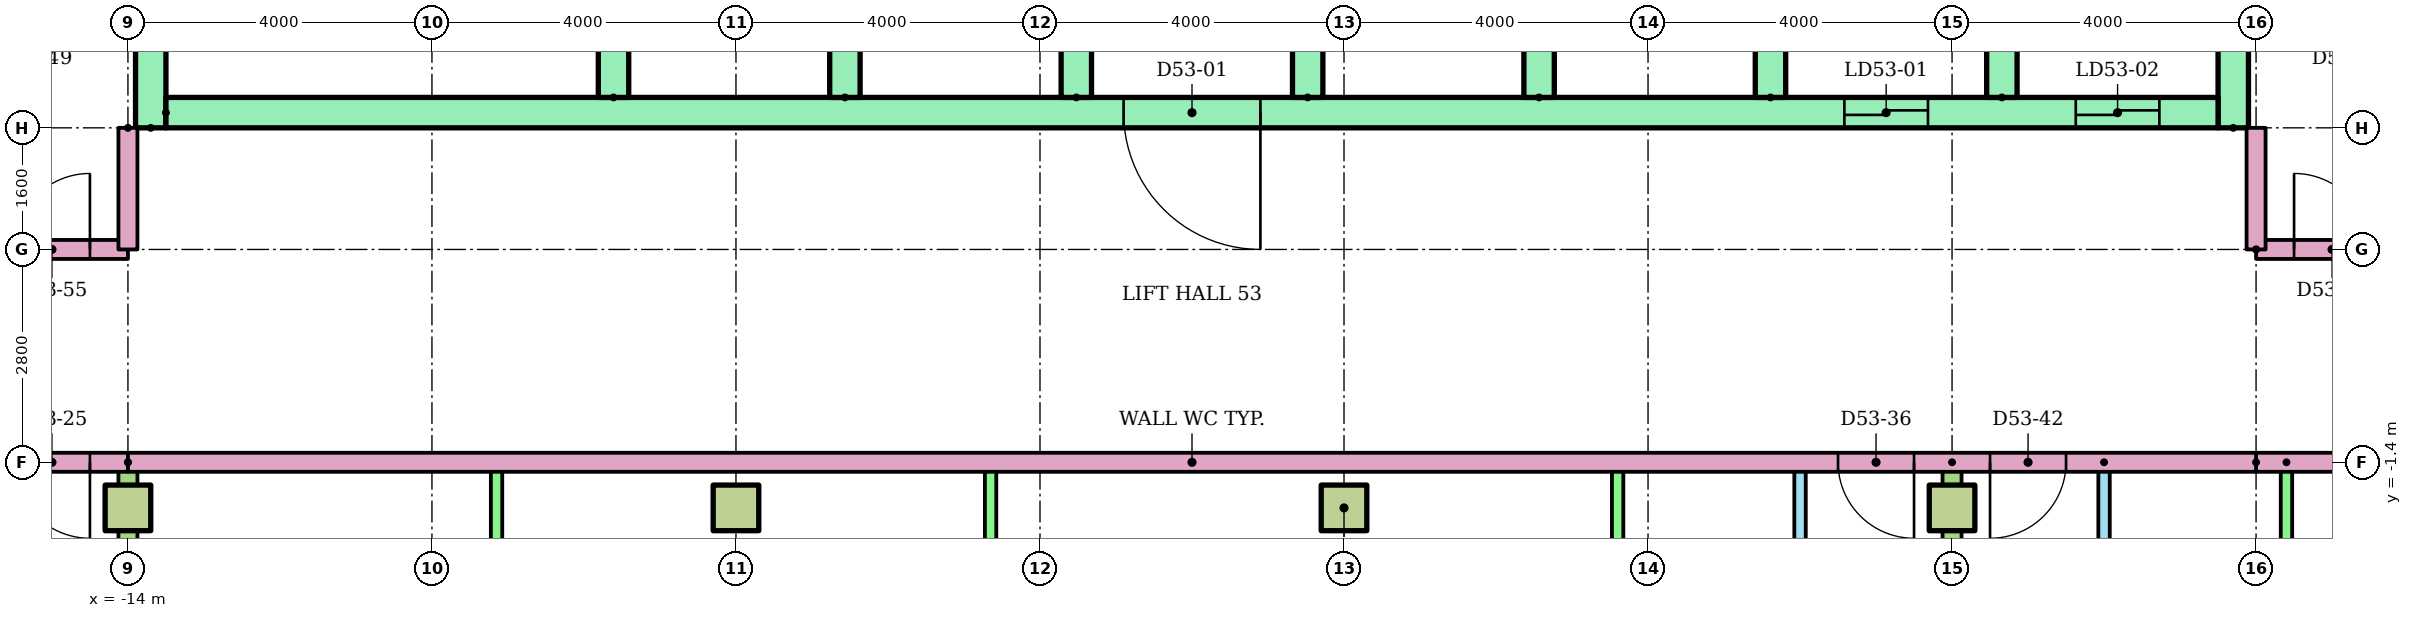
"""IFC4 building model, lengths in metres.
Left out: names, types, materials, properties, quantities, classifications, styles, units other than length and angle.
Written with IfcOpenShell. Run it as: python <this file> out.ifc"""

import sys

from ifc_helpers import new_model, si_unit, direction, frame, frame_2d, origin, origin_2d, place, context, subcontext, project, spatial, rectangle, extrude, element, fill, save


model = new_model("IFC4")
c1 = context("Model", 3, precision=1e-05, world=origin(), true_north=direction((0.0, 1.0)))
c2 = subcontext(c1, "Body", "Model", "MODEL_VIEW")
j1 = project(units=[si_unit("LENGTHUNIT", "METRE"), si_unit("PLANEANGLEUNIT", "RADIAN")], contexts=[c1])
p1 = place(None, origin())
s1 = spatial("IfcSite", under=j1, at=p1, CompositionType="ELEMENT")
p2 = place(p1, origin())
s2 = spatial("IfcBuilding", under=s1, at=p2, CompositionType="ELEMENT")
p3 = place(p2, frame((0.0, 0.0, 207.6)))
s3 = spatial("IfcBuildingStorey", under=s2, at=p3, CompositionType="ELEMENT", Elevation=207.6)
for number, where in (
    (1, (-14.0, -2.0, 0.0)),
    (2, (-6.0, -2.0, 0.0)),
    (3, (2.0, -2.0, 0.0)),
    (4, (10.0, -2.0, 0.0)),
):
    element("IfcColumn", number, at=place(p3, frame(where)), inside=s3, PredefinedType="COLUMN", context=c2, shape_type="SweptSolid", body=[
        extrude(rectangle(XDim=0.6, YDim=0.6, at=origin_2d()), origin(), (0.0, 0.0, 1.0), 3.2),
    ])
for number, where, z_axis, x_axis in (
    (5, (-13.7, 3.0, 0.0), (0.0, 0.0, 1.0), (0.0, 1.0, 0.0)),
    (6, (13.7, 3.0, 0.0), (0.0, 0.0, 1.0), (0.0, 1.0, 0.0)),
):
    element("IfcWall", number, at=place(p3, frame(where, z_axis=z_axis, x_axis=x_axis)), inside=s3, PredefinedType="SHEAR", context=c2, shape_type="SweptSolid", body=[
        extrude(rectangle(XDim=17.0, YDim=0.4, at=frame_2d((8.5, 0.0))), origin(), (0.0, 0.0, 1.0), 2.92),
    ])
p4 = place(p3, frame((-13.5, 3.2, 0.0)))
e7 = element("IfcWall", 7, at=p4, inside=s3, PredefinedType="SHEAR", context=c2, shape_type="SweptSolid", body=[
    extrude(rectangle(XDim=27.0, YDim=0.4, at=frame_2d((13.5, 0.0))), origin(), (0.0, 0.0, 1.0), 2.92),
])
p5 = place(p4, frame((22.083, 0.0, 0.0)))
e8 = element("IfcOpeningElement", 8, at=p5, cuts=e7, PredefinedType="OPENING", context=c2, shape_type="SweptSolid", body=[
    extrude(rectangle(XDim=1.1, YDim=2.1, at=frame_2d((0.55, 1.05))), frame((0.0, 0.21, 0.0), z_axis=(0.0, -1.0, 0.0), x_axis=(1.0, 0.0, 0.0)), (0.0, 0.0, 1.0), 0.42),
])
p6 = place(p4, frame((25.128, 0.0, 0.0)))
e9 = element("IfcOpeningElement", 9, at=p6, cuts=e7, PredefinedType="OPENING", context=c2, shape_type="SweptSolid", body=[
    extrude(rectangle(XDim=1.1, YDim=2.1, at=frame_2d((0.55, 1.05))), frame((0.0, 0.21, 0.0), z_axis=(0.0, -1.0, 0.0), x_axis=(1.0, 0.0, 0.0)), (0.0, 0.0, 1.0), 0.42),
])
p7 = place(p4, frame((12.6, 0.0, 0.0)))
e10 = element("IfcOpeningElement", 10, at=p7, cuts=e7, PredefinedType="OPENING", context=c2, shape_type="SweptSolid", body=[
    extrude(rectangle(XDim=1.8, YDim=2.1, at=frame_2d((0.9, 1.05))), frame((0.0, 0.21, 0.0), z_axis=(0.0, -1.0, 0.0), x_axis=(1.0, 0.0, 0.0)), (0.0, 0.0, 1.0), 0.42),
])
for number, where, z_axis, x_axis in (
    (11, (-7.611, 3.4, 0.0), (0.0, 0.0, 1.0), (0.0, 1.0, 0.0)),
    (12, (-4.567, 3.4, 0.0), (0.0, 0.0, 1.0), (0.0, 1.0, 0.0)),
    (13, (-1.522, 3.4, 0.0), (0.0, 0.0, 1.0), (0.0, 1.0, 0.0)),
    (14, (1.522, 3.4, 0.0), (0.0, 0.0, 1.0), (0.0, 1.0, 0.0)),
    (15, (4.567, 3.4, 0.0), (0.0, 0.0, 1.0), (0.0, 1.0, 0.0)),
    (16, (7.611, 3.4, 0.0), (0.0, 0.0, 1.0), (0.0, 1.0, 0.0)),
    (17, (10.656, 3.4, 0.0), (0.0, 0.0, 1.0), (0.0, 1.0, 0.0)),
):
    element("IfcWall", number, at=place(p3, frame(where, z_axis=z_axis, x_axis=x_axis)), inside=s3, PredefinedType="SHEAR", context=c2, shape_type="SweptSolid", body=[
        extrude(rectangle(XDim=3.0, YDim=0.4, at=frame_2d((1.5, 0.0))), origin(), (0.0, 0.0, 1.0), 2.92),
    ])
p8 = place(p3, frame((8.0, -8.2, 0.0), z_axis=(0.0, 0.0, 1.0), x_axis=(0.0, 1.0, 0.0)))
e18 = element("IfcWall", 18, at=p8, inside=s3, PredefinedType="PARTITIONING", context=c2, shape_type="SweptSolid", body=[
    extrude(rectangle(XDim=6.8, YDim=0.15, at=frame_2d((3.4, 0.0))), origin(), (0.0, 0.0, 1.0), 2.4),
])
p9 = place(p8, frame((4.475, 0.0, 0.0)))
e19 = element("IfcOpeningElement", 19, at=p9, cuts=e18, PredefinedType="OPENING", context=c2, shape_type="SweptSolid", body=[
    extrude(rectangle(XDim=0.9, YDim=2.1, at=frame_2d((0.45, 1.05))), frame((0.0, 0.085, 0.0), z_axis=(0.0, -1.0, 0.0), x_axis=(1.0, 0.0, 0.0)), (0.0, 0.0, 1.0), 0.17),
])
p10 = place(p8, frame((1.125, 0.0, 0.0)))
e20 = element("IfcOpeningElement", 20, at=p10, cuts=e18, PredefinedType="OPENING", context=c2, shape_type="SweptSolid", body=[
    extrude(rectangle(XDim=0.8, YDim=2.1, at=frame_2d((0.4, 1.05))), frame((0.0, 0.085, 0.0), z_axis=(0.0, -1.0, 0.0), x_axis=(1.0, 0.0, 0.0)), (0.0, 0.0, 1.0), 0.17),
])
for number, where, z_axis, x_axis in (
    (21, (5.6, -8.2, 0.0), (0.0, 0.0, 1.0), (0.0, 1.0, 0.0)),
    (22, (-2.65, -8.2, 0.0), (0.0, 0.0, 1.0), (0.0, 1.0, 0.0)),
    (23, (-9.15, -8.2, 0.0), (0.0, 0.0, 1.0), (0.0, 1.0, 0.0)),
):
    element("IfcWall", number, at=place(p3, frame(where, z_axis=z_axis, x_axis=x_axis)), inside=s3, PredefinedType="PARTITIONING", context=c2, shape_type="SweptSolid", body=[
        extrude(rectangle(XDim=6.8, YDim=0.15, at=frame_2d((3.4, 0.0))), origin(), (0.0, 0.0, 1.0), 2.4),
    ])
p11 = place(p3, frame((-14.0, -1.4, 0.0), z_axis=(0.0, 0.0, 1.0), x_axis=(0.0, -1.0, 0.0)))
e24 = element("IfcWall", 24, at=p11, inside=s3, PredefinedType="PARTITIONING", context=c2, shape_type="SweptSolid", body=[
    extrude(rectangle(XDim=15.11, YDim=0.25, at=frame_2d((7.555, 0.0))), origin(), (0.0, 0.0, 1.0), 2.4),
])
p12 = place(p3, frame((12.0, -1.4, 0.0), z_axis=(0.0, 0.0, 1.0), x_axis=(0.0, -1.0, 0.0)))
e25 = element("IfcWall", 25, at=p12, inside=s3, PredefinedType="PARTITIONING", context=c2, shape_type="SweptSolid", body=[
    extrude(rectangle(XDim=6.8, YDim=0.15, at=frame_2d((3.4, 0.0))), origin(), (0.0, 0.0, 1.0), 2.4),
])
p13 = place(p12, frame((1.425, 0.0, 0.0)))
e26 = element("IfcOpeningElement", 26, at=p13, cuts=e25, PredefinedType="OPENING", context=c2, shape_type="SweptSolid", body=[
    extrude(rectangle(XDim=0.9, YDim=2.1, at=frame_2d((0.45, 1.05))), frame((0.0, 0.085, 0.0), z_axis=(0.0, -1.0, 0.0), x_axis=(1.0, 0.0, 0.0)), (0.0, 0.0, 1.0), 0.17),
])
p14 = place(p12, frame((4.875, 0.0, 0.0)))
e27 = element("IfcOpeningElement", 27, at=p14, cuts=e25, PredefinedType="OPENING", context=c2, shape_type="SweptSolid", body=[
    extrude(rectangle(XDim=0.8, YDim=2.1, at=frame_2d((0.4, 1.05))), frame((0.0, 0.085, 0.0), z_axis=(0.0, -1.0, 0.0), x_axis=(1.0, 0.0, 0.0)), (0.0, 0.0, 1.0), 0.17),
])
p15 = place(p3, frame((14.4, -1.4, 0.0), z_axis=(0.0, 0.0, 1.0), x_axis=(0.0, -1.0, 0.0)))
e28 = element("IfcWall", 28, at=p15, inside=s3, PredefinedType="PARTITIONING", context=c2, shape_type="SweptSolid", body=[
    extrude(rectangle(XDim=6.8, YDim=0.15, at=frame_2d((3.4, 0.0))), origin(), (0.0, 0.0, 1.0), 2.4),
])
p16 = place(p3, frame((10.0, -1.4, 0.0), z_axis=(0.0, 0.0, 1.0), x_axis=(0.0, -1.0, 0.0)))
e29 = element("IfcWall", 29, at=p16, inside=s3, PredefinedType="PARTITIONING", context=c2, shape_type="SweptSolid", body=[
    extrude(rectangle(XDim=15.11, YDim=0.25, at=frame_2d((7.555, 0.0))), origin(), (0.0, 0.0, 1.0), 2.4),
])
p17 = place(p3, frame((-14.0, -1.4, 0.0), z_axis=(0.0, 0.0, 1.0), x_axis=(-1.0, 0.0, 0.0)))
e30 = element("IfcWall", 30, at=p17, inside=s3, PredefinedType="PARTITIONING", context=c2, shape_type="SweptSolid", body=[
    extrude(rectangle(XDim=14.92, YDim=0.25, at=frame_2d((7.46, 0.0))), origin(), (0.0, 0.0, 1.0), 2.4),
])
p18 = place(p17, frame((0.5, 0.0, 0.0)))
e31 = element("IfcOpeningElement", 31, at=p18, cuts=e30, PredefinedType="OPENING", context=c2, shape_type="SweptSolid", body=[
    extrude(rectangle(XDim=1.0, YDim=2.1, at=frame_2d((0.5, 1.05))), frame((0.0, 0.135, 0.0), z_axis=(0.0, -1.0, 0.0), x_axis=(1.0, 0.0, 0.0)), (0.0, 0.0, 1.0), 0.27),
])
p19 = place(p3, frame((28.92, -1.4, 0.0), z_axis=(0.0, 0.0, 1.0), x_axis=(-1.0, 0.0, 0.0)))
e32 = element("IfcWall", 32, at=p19, inside=s3, PredefinedType="PARTITIONING", context=c2, shape_type="SweptSolid", body=[
    extrude(rectangle(XDim=14.92, YDim=0.25, at=frame_2d((7.46, 0.0))), origin(), (0.0, 0.0, 1.0), 2.4),
])
p20 = place(p19, frame((9.42, 0.0, 0.0)))
e33 = element("IfcOpeningElement", 33, at=p20, cuts=e32, PredefinedType="OPENING", context=c2, shape_type="SweptSolid", body=[
    extrude(rectangle(XDim=1.0, YDim=2.1, at=frame_2d((0.5, 1.05))), frame((0.0, 0.135, 0.0), z_axis=(0.0, -1.0, 0.0), x_axis=(1.0, 0.0, 0.0)), (0.0, 0.0, 1.0), 0.27),
])
p21 = place(p3, frame((-28.92, 1.4, 0.0)))
e34 = element("IfcWall", 34, at=p21, inside=s3, PredefinedType="PARTITIONING", context=c2, shape_type="SweptSolid", body=[
    extrude(rectangle(XDim=14.92, YDim=0.25, at=frame_2d((7.46, 0.0))), origin(), (0.0, 0.0, 1.0), 2.4),
])
p22 = place(p21, frame((13.42, 0.0, 0.0)))
e35 = element("IfcOpeningElement", 35, at=p22, cuts=e34, PredefinedType="OPENING", context=c2, shape_type="SweptSolid", body=[
    extrude(rectangle(XDim=1.0, YDim=2.1, at=frame_2d((0.5, 1.05))), frame((0.0, 0.135, 0.0), z_axis=(0.0, -1.0, 0.0), x_axis=(1.0, 0.0, 0.0)), (0.0, 0.0, 1.0), 0.27),
])
p23 = place(p3, frame((14.0, 1.4, 0.0)))
e36 = element("IfcWall", 36, at=p23, inside=s3, PredefinedType="PARTITIONING", context=c2, shape_type="SweptSolid", body=[
    extrude(rectangle(XDim=14.92, YDim=0.25, at=frame_2d((7.46, 0.0))), origin(), (0.0, 0.0, 1.0), 2.4),
])
p24 = place(p23, frame((0.5, 0.0, 0.0)))
e37 = element("IfcOpeningElement", 37, at=p24, cuts=e36, PredefinedType="OPENING", context=c2, shape_type="SweptSolid", body=[
    extrude(rectangle(XDim=1.0, YDim=2.1, at=frame_2d((0.5, 1.05))), frame((0.0, 0.135, 0.0), z_axis=(0.0, -1.0, 0.0), x_axis=(1.0, 0.0, 0.0)), (0.0, 0.0, 1.0), 0.27),
])
p25 = place(p3, frame((14.0, -1.4, 0.0), z_axis=(0.0, 0.0, 1.0), x_axis=(-1.0, 0.0, 0.0)))
e38 = element("IfcWall", 38, at=p25, inside=s3, PredefinedType="PARTITIONING", context=c2, shape_type="SweptSolid", body=[
    extrude(rectangle(XDim=28.0, YDim=0.25, at=frame_2d((14.0, 0.0))), origin(), (0.0, 0.0, 1.0), 2.4),
])
p26 = place(p25, frame((4.5, 0.0, 0.0)))
e39 = element("IfcOpeningElement", 39, at=p26, cuts=e38, PredefinedType="OPENING", context=c2, shape_type="SweptSolid", body=[
    extrude(rectangle(XDim=1.0, YDim=2.1, at=frame_2d((0.5, 1.05))), frame((0.0, 0.135, 0.0), z_axis=(0.0, -1.0, 0.0), x_axis=(1.0, 0.0, 0.0)), (0.0, 0.0, 1.0), 0.27),
])
p27 = place(p25, frame((2.5, 0.0, 0.0)))
e40 = element("IfcOpeningElement", 40, at=p27, cuts=e38, PredefinedType="OPENING", context=c2, shape_type="SweptSolid", body=[
    extrude(rectangle(XDim=1.0, YDim=2.1, at=frame_2d((0.5, 1.05))), frame((0.0, 0.135, 0.0), z_axis=(0.0, -1.0, 0.0), x_axis=(1.0, 0.0, 0.0)), (0.0, 0.0, 1.0), 0.27),
])
for number, where, z_axis, x_axis in (
    (41, (-14.0, 3.0, 0.0), (0.0, 0.0, 1.0), (0.0, -1.0, 0.0)),
    (42, (14.0, 1.4, 0.0), (0.0, 0.0, 1.0), (0.0, 1.0, 0.0)),
):
    element("IfcWall", number, at=place(p3, frame(where, z_axis=z_axis, x_axis=x_axis)), inside=s3, PredefinedType="PARTITIONING", context=c2, shape_type="SweptSolid", body=[
        extrude(rectangle(XDim=1.6, YDim=0.25, at=frame_2d((0.8, 0.0))), origin(), (0.0, 0.0, 1.0), 2.4),
    ])
p28 = place(p5, origin())
e43 = element("IfcDoor", 43, at=p28, inside=s3, OperationType="SLIDING_TO_LEFT", PredefinedType="DOOR", context=c2, shape_type="SweptSolid", body=[
    extrude(rectangle(XDim=1.1, YDim=2.1, at=frame_2d((0.55, 1.05))), frame((0.0, 0.025, 0.0), z_axis=(0.0, -1.0, 0.0), x_axis=(1.0, 0.0, 0.0)), (0.0, 0.0, 1.0), 0.05),
])
fill(e8, e43)
p29 = place(p6, origin())
e44 = element("IfcDoor", 44, at=p29, inside=s3, OperationType="SLIDING_TO_LEFT", PredefinedType="DOOR", context=c2, shape_type="SweptSolid", body=[
    extrude(rectangle(XDim=1.1, YDim=2.1, at=frame_2d((0.55, 1.05))), frame((0.0, 0.025, 0.0), z_axis=(0.0, -1.0, 0.0), x_axis=(1.0, 0.0, 0.0)), (0.0, 0.0, 1.0), 0.05),
])
fill(e9, e44)
p30 = place(p7, frame((1.8, 0.0, 0.0), z_axis=(0.0, 0.0, 1.0), x_axis=(-1.0, 0.0, 0.0)))
e45 = element("IfcDoor", 45, at=p30, inside=s3, OperationType="DOUBLE_DOOR_SINGLE_SWING", PredefinedType="DOOR", context=c2, shape_type="SweptSolid", body=[
    extrude(rectangle(XDim=1.8, YDim=2.1, at=frame_2d((0.9, 1.05))), frame((0.0, 0.025, 0.0), z_axis=(0.0, -1.0, 0.0), x_axis=(1.0, 0.0, 0.0)), (0.0, 0.0, 1.0), 0.05),
])
fill(e10, e45)
p31 = place(p18, origin())
e46 = element("IfcDoor", 46, at=p31, inside=s3, OperationType="SINGLE_SWING_LEFT", PredefinedType="DOOR", context=c2, shape_type="SweptSolid", body=[
    extrude(rectangle(XDim=1.0, YDim=2.1, at=frame_2d((0.5, 1.05))), frame((0.0, 0.025, 0.0), z_axis=(0.0, -1.0, 0.0), x_axis=(1.0, 0.0, 0.0)), (0.0, 0.0, 1.0), 0.05),
])
fill(e31, e46)
p32 = place(p26, origin())
e47 = element("IfcDoor", 47, at=p32, inside=s3, OperationType="SINGLE_SWING_LEFT", PredefinedType="DOOR", context=c2, shape_type="SweptSolid", body=[
    extrude(rectangle(XDim=1.0, YDim=2.1, at=frame_2d((0.5, 1.05))), frame((0.0, 0.025, 0.0), z_axis=(0.0, -1.0, 0.0), x_axis=(1.0, 0.0, 0.0)), (0.0, 0.0, 1.0), 0.05),
])
fill(e39, e47)
p33 = place(p27, origin())
e48 = element("IfcDoor", 48, at=p33, inside=s3, OperationType="SINGLE_SWING_RIGHT", PredefinedType="DOOR", context=c2, shape_type="SweptSolid", body=[
    extrude(rectangle(XDim=1.0, YDim=2.1, at=frame_2d((0.5, 1.05))), frame((0.0, 0.025, 0.0), z_axis=(0.0, -1.0, 0.0), x_axis=(1.0, 0.0, 0.0)), (0.0, 0.0, 1.0), 0.05),
])
fill(e40, e48)
p34 = place(p22, origin())
e49 = element("IfcDoor", 49, at=p34, inside=s3, OperationType="SINGLE_SWING_RIGHT", PredefinedType="DOOR", context=c2, shape_type="SweptSolid", body=[
    extrude(rectangle(XDim=1.0, YDim=2.1, at=frame_2d((0.5, 1.05))), frame((0.0, 0.025, 0.0), z_axis=(0.0, -1.0, 0.0), x_axis=(1.0, 0.0, 0.0)), (0.0, 0.0, 1.0), 0.05),
])
fill(e35, e49)
p35 = place(p24, origin())
e50 = element("IfcDoor", 50, at=p35, inside=s3, OperationType="SINGLE_SWING_LEFT", PredefinedType="DOOR", context=c2, shape_type="SweptSolid", body=[
    extrude(rectangle(XDim=1.0, YDim=2.1, at=frame_2d((0.5, 1.05))), frame((0.0, 0.025, 0.0), z_axis=(0.0, -1.0, 0.0), x_axis=(1.0, 0.0, 0.0)), (0.0, 0.0, 1.0), 0.05),
])
fill(e37, e50)
save(model, sys.argv[1])
